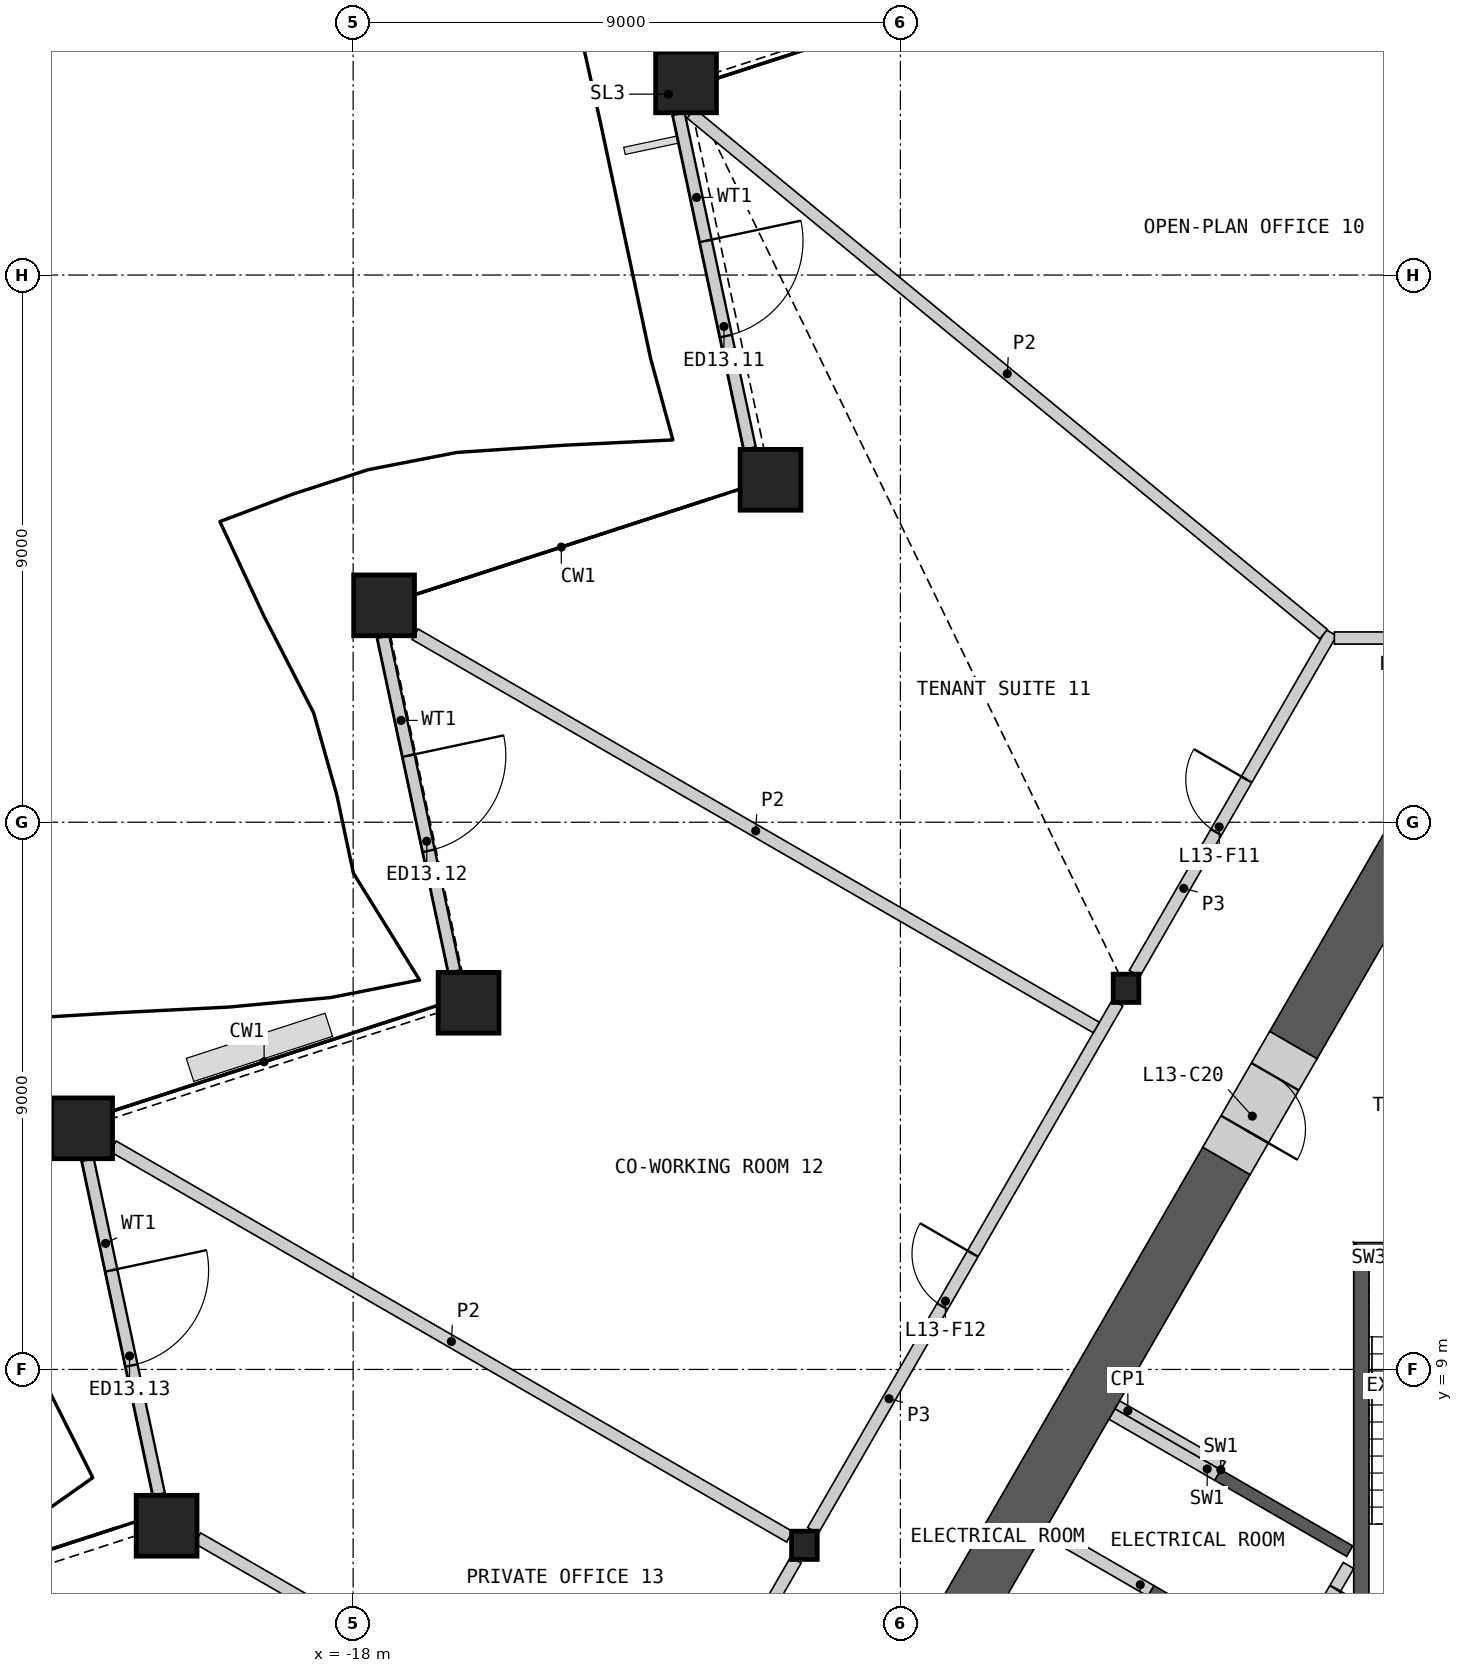
"""IFC4 building model, lengths in metres.
Left out: names, types, materials, properties, quantities, classifications, styles, units other than length and angle.
Written with IfcOpenShell. Run it as: python <this file> out.ifc"""

import sys

from ifc_helpers import new_model, si_unit, direction, frame, frame_2d, origin, origin_2d, place, context, subcontext, project, spatial, polyline, rectangle, hollow_rectangle, i_section, outline, extrude, element, fill, save


model = new_model("IFC4")
c1 = context("Model", 3, precision=1e-05, world=origin(), true_north=direction((0.0, 1.0)))
c2 = subcontext(c1, "Body", "Model", "MODEL_VIEW")
j1 = project(units=[si_unit("LENGTHUNIT", "METRE"), si_unit("PLANEANGLEUNIT", "RADIAN")], contexts=[c1])
p1 = place(None, origin())
s1 = spatial("IfcSite", under=j1, at=p1, CompositionType="ELEMENT")
p2 = place(p1, origin())
s2 = spatial("IfcBuilding", under=s1, at=p2, CompositionType="ELEMENT")
p3 = place(p2, frame((0.0, 0.0, 63.6)))
s3 = spatial("IfcBuildingStorey", under=s2, at=p3, CompositionType="ELEMENT", Elevation=63.6)
for number, where, z_axis, x_axis in (
    (1, (-12.525, 30.169, 0.0), (0.0, 0.0, 1.0), (1.0, 0.0, 0.0)),
    (2, (-11.136, 23.632, 0.0), (0.0, 0.0, 1.0), (1.0, 0.0, 0.0)),
    (3, (-17.491, 21.567, 0.0), (0.0, 0.0, 1.0), (1.0, 0.0, 0.0)),
    (4, (-16.102, 15.031, 0.0), (0.0, 0.0, 1.0), (1.0, 0.0, 0.0)),
    (5, (-22.457, 12.966, 0.0), (0.0, 0.0, 1.0), (1.0, 0.0, 0.0)),
    (6, (-21.068, 6.429, 0.0), (0.0, 0.0, 1.0), (1.0, 0.0, 0.0)),
):
    element("IfcColumn", number, at=place(p3, frame(where, z_axis=z_axis, x_axis=x_axis)), inside=s3, PredefinedType="COLUMN", context=c2, shape_type="SweptSolid", body=[
        extrude(hollow_rectangle(XDim=1.0, YDim=1.0, WallThickness=0.07, at=origin_2d()), origin(), (0.0, 0.0, 1.0), 4.2),
    ])
for number, where, z_axis, x_axis in (
    (7, (-5.289, 15.269, 0.0), (0.0, 0.0, 1.0), (1.0, 0.0, 0.0)),
    (8, (-10.578, 6.107, 0.0), (0.0, 0.0, 1.0), (1.0, 0.0, 0.0)),
):
    element("IfcColumn", number, at=place(p3, frame(where, z_axis=z_axis, x_axis=x_axis)), inside=s3, PredefinedType="COLUMN", context=c2, shape_type="SweptSolid", body=[
        extrude(i_section(OverallWidth=0.421, OverallDepth=0.465, WebThickness=0.045, FlangeThickness=0.072, at=origin_2d()), origin(), (0.0, 0.0, 1.0), 4.2),
    ])
p4 = place(p3, frame((-12.646, 29.652, 0.0), z_axis=(0.0, 0.0, 1.0), x_axis=(0.207901831982, -0.978149696242, 0.0)))
e9 = element("IfcWall", 9, at=p4, inside=s3, PredefinedType="SOLIDWALL", context=c2, shape_type="SweptSolid", body=[
    extrude(rectangle(XDim=5.626, YDim=0.2, at=frame_2d((2.813, 0.0))), origin(), (0.0, 0.0, 1.0), 3.189),
])
p5 = place(p4, frame((2.137, 0.0, 0.0)))
e10 = element("IfcOpeningElement", 10, at=p5, cuts=e9, PredefinedType="OPENING", context=c2, shape_type="SweptSolid", body=[
    extrude(rectangle(XDim=1.6, YDim=2.4, at=frame_2d((0.8, 1.2))), frame((0.0, 0.11, 0.0), z_axis=(0.0, -1.0, 0.0), x_axis=(1.0, 0.0, 0.0)), (0.0, 0.0, 1.0), 0.22),
])
p6 = place(p3, frame((-17.504, 21.051, 0.0), z_axis=(0.0, 0.0, 1.0), x_axis=(0.207901831982, -0.978149696242, 0.0)))
e11 = element("IfcWall", 11, at=p6, inside=s3, PredefinedType="SOLIDWALL", context=c2, shape_type="SweptSolid", body=[
    extrude(rectangle(XDim=5.626, YDim=0.2, at=frame_2d((2.813, 0.0))), origin(), (0.0, 0.0, 1.0), 3.189),
])
p7 = place(p6, frame((1.998, 0.0, 0.0)))
e12 = element("IfcOpeningElement", 12, at=p7, cuts=e11, PredefinedType="OPENING", context=c2, shape_type="SweptSolid", body=[
    extrude(rectangle(XDim=1.6, YDim=2.4, at=frame_2d((0.8, 1.2))), frame((0.0, 0.11, 0.0), z_axis=(0.0, -1.0, 0.0), x_axis=(1.0, 0.0, 0.0)), (0.0, 0.0, 1.0), 0.22),
])
p8 = place(p3, frame((-22.363, 12.449, 0.0), z_axis=(0.0, 0.0, 1.0), x_axis=(0.207901831982, -0.978149696242, 0.0)))
e13 = element("IfcWall", 13, at=p8, inside=s3, PredefinedType="SOLIDWALL", context=c2, shape_type="SweptSolid", body=[
    extrude(rectangle(XDim=5.626, YDim=0.2, at=frame_2d((2.813, 0.0))), origin(), (0.0, 0.0, 1.0), 3.189),
])
p9 = place(p8, frame((1.86, 0.0, 0.0)))
e14 = element("IfcOpeningElement", 14, at=p9, cuts=e13, PredefinedType="OPENING", context=c2, shape_type="SweptSolid", body=[
    extrude(rectangle(XDim=1.6, YDim=2.4, at=frame_2d((0.8, 1.2))), frame((0.0, 0.11, 0.0), z_axis=(0.0, -1.0, 0.0), x_axis=(1.0, 0.0, 0.0)), (0.0, 0.0, 1.0), 0.22),
])
p10 = place(p3, origin())
e15 = element("IfcWall", 15, at=p10, inside=s3, PredefinedType="SHEAR", context=c2, shape_type="SweptSolid", body=[
    extrude(outline(polyline([(-2.76, 4.019), (-4.931, 5.272), (-4.831, 5.445), (-2.66, 4.192), (-2.76, 4.019)])), origin(), (0.0, 0.0, 1.0), 3.8),
])
p11 = place(p3, origin())
e16 = element("IfcWall", 16, at=p11, inside=s3, PredefinedType="SHEAR", context=c2, shape_type="SweptSolid", body=[
    extrude(outline(polyline([(-3.731, 7.35), (-1.561, 6.097), (-1.66, 5.924), (-3.831, 7.177), (-3.731, 7.35)])), origin(), (0.0, 0.0, 1.0), 3.8),
])
p12 = place(p3, frame((-1.631, 5.776, 0.0), z_axis=(0.0, 0.0, 1.0), x_axis=(-0.499992876559, -0.866029516466, 0.0)))
e17 = element("IfcWall", 17, at=p12, inside=s3, PredefinedType="SOLIDWALL", context=c2, shape_type="SweptSolid", body=[
    extrude(rectangle(XDim=6.486, YDim=0.2, at=frame_2d((3.243, 0.0))), origin(), (0.0, 0.0, 1.0), 3.8),
])
p13 = place(p12, frame((0.437, 0.0, 0.0)))
e18 = element("IfcOpeningElement", 18, at=p13, cuts=e17, PredefinedType="OPENING", context=c2, shape_type="SweptSolid", body=[
    extrude(rectangle(XDim=0.9, YDim=2.1, at=frame_2d((0.45, 1.05))), frame((0.0, 0.11, 0.0), z_axis=(0.0, -1.0, 0.0), x_axis=(1.0, 0.0, 0.0)), (0.0, 0.0, 1.0), 0.22),
])
p14 = place(p12, frame((2.637, 0.0, 0.0)))
e19 = element("IfcOpeningElement", 19, at=p14, cuts=e17, PredefinedType="OPENING", context=c2, shape_type="SweptSolid", body=[
    extrude(rectangle(XDim=0.9, YDim=2.1, at=frame_2d((0.45, 1.05))), frame((0.0, 0.11, 0.0), z_axis=(0.0, -1.0, 0.0), x_axis=(1.0, 0.0, 0.0)), (0.0, 0.0, 1.0), 0.22),
])
p15 = place(p3, frame((-3.781, 7.263, 0.0), z_axis=(0.0, 0.0, 1.0), x_axis=(-0.865983199114, 0.50007309351, 0.0)))
e20 = element("IfcWall", 20, at=p15, inside=s3, PredefinedType="SHEAR", context=c2, shape_type="SweptSolid", body=[
    extrude(rectangle(XDim=2.009, YDim=0.2, at=frame_2d((1.004, 0.0))), origin(), (0.0, 0.0, 1.0), 3.8),
])
p16 = place(p3, frame((-4.881, 5.358, 0.0), z_axis=(0.0, 0.0, 1.0), x_axis=(-0.866035824272, 0.499981950752, 0.0)))
e21 = element("IfcWall", 21, at=p16, inside=s3, PredefinedType="SHEAR", context=c2, shape_type="SweptSolid", body=[
    extrude(rectangle(XDim=2.009, YDim=0.2, at=frame_2d((1.004, 0.0))), origin(), (0.0, 0.0, 1.0), 3.8),
])
p17 = place(p3, origin())
e22 = element("IfcWall", 22, at=p17, inside=s3, PredefinedType="SHEAR", context=c2, shape_type="SweptSolid", body=[
    extrude(outline(polyline([(1.544, 11.087), (-1.544, 11.087), (-1.294, 10.837), (1.294, 10.837), (1.544, 11.087)])), origin(), (0.0, 0.0, 1.0), 3.8),
])
p18 = place(p3, origin())
e23 = element("IfcWall", 23, at=p18, inside=s3, PredefinedType="SHEAR", context=c2, shape_type="SweptSolid", body=[
    extrude(outline(polyline([(-1.294, 10.837), (-1.544, 11.087), (-1.544, 5.237), (-1.294, 5.237), (-1.294, 10.837)])), origin(), (0.0, 0.0, 1.0), 3.8),
])
p19 = place(p3, frame((-3.693, 7.415, 0.0), z_axis=(0.0, 0.0, 1.0), x_axis=(-0.866035824272, 0.499981950752, 0.0)))
e24 = element("IfcWall", 24, at=p19, inside=s3, PredefinedType="PARTITIONING", context=c2, shape_type="SweptSolid", body=[
    extrude(rectangle(XDim=2.009, YDim=0.15, at=frame_2d((1.004, 0.0))), origin(), (0.0, 0.0, 1.0), 3.8),
])
p20 = place(p3, frame((-3.637, 12.43, 0.0), z_axis=(0.0, 0.0, 1.0), x_axis=(-0.500011513458, -0.866018756384, 0.0)))
e25 = element("IfcWall", 25, at=p20, inside=s3, PredefinedType="SHEAR", context=c2, shape_type="SweptSolid", body=[
    extrude(rectangle(XDim=9.066, YDim=0.9, at=frame_2d((4.533, 0.0))), origin(), (0.0, 0.0, 1.0), 3.8),
])
p21 = place(p3, frame((-0.39, 18.055, 0.0), z_axis=(0.0, 0.0, 1.0), x_axis=(-0.500014347272, -0.866017120224, 0.0)))
e26 = element("IfcWall", 26, at=p21, inside=s3, PredefinedType="SHEAR", context=c2, shape_type="SweptSolid", body=[
    extrude(rectangle(XDim=4.296, YDim=0.9, at=frame_2d((2.148, 0.0))), origin(), (0.0, 0.0, 1.0), 3.8),
])
p22 = place(p3, frame((-2.538, 14.335, 0.0), z_axis=(0.0, 0.0, 1.0), x_axis=(-0.499994660107, -0.866028486751, 0.0)))
e27 = element("IfcWall", 27, at=p22, inside=s3, PredefinedType="SHEAR", context=c2, shape_type="SweptSolid", body=[
    extrude(rectangle(XDim=2.2, YDim=0.9, at=frame_2d((1.1, 0.0))), origin(), (0.0, 0.0, 1.0), 3.8),
])
p23 = place(p22, frame((0.6, 0.0, 0.0)))
e28 = element("IfcOpeningElement", 28, at=p23, cuts=e27, PredefinedType="OPENING", context=c2, shape_type="SweptSolid", body=[
    extrude(rectangle(XDim=1.0, YDim=2.1, at=frame_2d((0.5, 1.05))), frame((0.0, 0.46, 0.0), z_axis=(0.0, -1.0, 0.0), x_axis=(1.0, 0.0, 0.0)), (0.0, 0.0, 1.0), 0.92),
])
p24 = place(p3, frame((-10.439, 6.35, 0.0), z_axis=(0.0, 0.0, 1.0), x_axis=(0.50001002959, 0.86601961312, 0.0)))
e29 = element("IfcWall", 29, at=p24, inside=s3, PredefinedType="PARTITIONING", context=c2, shape_type="SweptSolid", body=[
    extrude(rectangle(XDim=10.019, YDim=0.2, at=frame_2d((5.009, 0.0))), origin(), (0.0, 0.0, 1.0), 3.8),
])
p25 = place(p24, frame((4.259, 0.0, 0.0)))
e30 = element("IfcOpeningElement", 30, at=p25, cuts=e29, PredefinedType="OPENING", context=c2, shape_type="SweptSolid", body=[
    extrude(rectangle(XDim=1.0, YDim=2.1, at=frame_2d((0.5, 1.05))), frame((0.0, 0.11, 0.0), z_axis=(0.0, -1.0, 0.0), x_axis=(1.0, 0.0, 0.0)), (0.0, 0.0, 1.0), 0.22),
])
p26 = place(p3, frame((-15.728, -2.811, 0.0), z_axis=(0.0, 0.0, 1.0), x_axis=(0.49999175339, 0.866030164915, 0.0)))
e31 = element("IfcWall", 31, at=p26, inside=s3, PredefinedType="PARTITIONING", context=c2, shape_type="SweptSolid", body=[
    extrude(rectangle(XDim=10.019, YDim=0.2, at=frame_2d((5.009, 0.0))), origin(), (0.0, 0.0, 1.0), 3.8),
])
p27 = place(p26, frame((7.266, 0.0, 0.0)))
e32 = element("IfcOpeningElement", 32, at=p27, cuts=e31, PredefinedType="OPENING", context=c2, shape_type="SweptSolid", body=[
    extrude(rectangle(XDim=1.0, YDim=2.1, at=frame_2d((0.5, 1.05))), frame((0.0, 0.11, 0.0), z_axis=(0.0, -1.0, 0.0), x_axis=(1.0, 0.0, 0.0)), (0.0, 0.0, 1.0), 0.22),
])
p28 = place(p3, frame((-5.149, 15.511, 0.0), z_axis=(0.0, 0.0, 1.0), x_axis=(0.500001069878, 0.866024786089, 0.0)))
e33 = element("IfcWall", 33, at=p28, inside=s3, PredefinedType="PARTITIONING", context=c2, shape_type="SweptSolid", body=[
    extrude(rectangle(XDim=6.473, YDim=0.2, at=frame_2d((3.236, 0.0))), origin(), (0.0, 0.0, 1.0), 3.8),
])
p29 = place(p28, frame((2.686, 0.0, 0.0)))
e34 = element("IfcOpeningElement", 34, at=p29, cuts=e33, PredefinedType="OPENING", context=c2, shape_type="SweptSolid", body=[
    extrude(rectangle(XDim=1.0, YDim=2.1, at=frame_2d((0.5, 1.05))), frame((0.0, 0.11, 0.0), z_axis=(0.0, -1.0, 0.0), x_axis=(1.0, 0.0, 0.0)), (0.0, 0.0, 1.0), 0.22),
])
p30 = place(p3, frame((-1.863, 21.03, 0.0), z_axis=(0.0, 0.0, 1.0), x_axis=(1.0, 0.0, 0.0)))
e35 = element("IfcWall", 35, at=p30, inside=s3, PredefinedType="PARTITIONING", context=c2, shape_type="SweptSolid", body=[
    extrude(rectangle(XDim=3.726, YDim=0.2, at=frame_2d((1.863, 0.0))), origin(), (0.0, 0.0, 1.0), 3.8),
])
p31 = place(p30, frame((0.963, 0.0, 0.0)))
e36 = element("IfcOpeningElement", 36, at=p31, cuts=e35, PredefinedType="OPENING", context=c2, shape_type="SweptSolid", body=[
    extrude(rectangle(XDim=1.8, YDim=2.1, at=frame_2d((0.9, 1.05))), frame((0.0, 0.11, 0.0), z_axis=(0.0, -1.0, 0.0), x_axis=(1.0, 0.0, 0.0)), (0.0, 0.0, 1.0), 0.22),
])
p32 = place(p3, frame((-12.445, 29.659, 0.0), z_axis=(0.0, 0.0, 1.0), x_axis=(0.772048928551, -0.635563098302, 0.0)))
e37 = element("IfcWall", 37, at=p32, inside=s3, PredefinedType="PARTITIONING", context=c2, shape_type="SweptSolid", body=[
    extrude(rectangle(XDim=13.477, YDim=0.2, at=frame_2d((6.738, 0.0))), origin(), (0.0, 0.0, 1.0), 2.885),
])
p33 = place(p3, frame((-16.981, 21.092, 0.0), z_axis=(0.0, 0.0, 1.0), x_axis=(0.866026884493, -0.499997435328, 0.0)))
e38 = element("IfcWall", 38, at=p33, inside=s3, PredefinedType="PARTITIONING", context=c2, shape_type="SweptSolid", body=[
    extrude(rectangle(XDim=12.937, YDim=0.2, at=frame_2d((6.469, 0.0))), origin(), (0.0, 0.0, 1.0), 2.885),
])
p34 = place(p3, frame((-21.947, 12.671, 0.0), z_axis=(0.0, 0.0, 1.0), x_axis=(0.866026729935, -0.499997703033, 0.0)))
e39 = element("IfcWall", 39, at=p34, inside=s3, PredefinedType="PARTITIONING", context=c2, shape_type="SweptSolid", body=[
    extrude(rectangle(XDim=12.848, YDim=0.2, at=frame_2d((6.424, 0.0))), origin(), (0.0, 0.0, 1.0), 2.885),
])
p35 = place(p3, frame((-20.558, 6.225, 0.0), z_axis=(0.0, 0.0, 1.0), x_axis=(0.866031967744, -0.499988630717, 0.0)))
e40 = element("IfcWall", 40, at=p35, inside=s3, PredefinedType="PARTITIONING", context=c2, shape_type="SweptSolid", body=[
    extrude(rectangle(XDim=8.601, YDim=0.2, at=frame_2d((4.301, 0.0))), origin(), (0.0, 0.0, 1.0), 2.885),
])
p36 = place(p5, origin())
e41 = element("IfcDoor", 41, at=p36, inside=s3, OperationType="DOUBLE_DOOR_SINGLE_SWING", PredefinedType="DOOR", context=c2, shape_type="SweptSolid", body=[
    extrude(rectangle(XDim=1.6, YDim=2.4, at=frame_2d((0.8, 1.2))), frame((0.0, 0.025, 0.0), z_axis=(0.0, -1.0, 0.0), x_axis=(1.0, 0.0, 0.0)), (0.0, 0.0, 1.0), 0.05),
])
fill(e10, e41)
p37 = place(p7, origin())
e42 = element("IfcDoor", 42, at=p37, inside=s3, OperationType="DOUBLE_DOOR_SINGLE_SWING", PredefinedType="DOOR", context=c2, shape_type="SweptSolid", body=[
    extrude(rectangle(XDim=1.6, YDim=2.4, at=frame_2d((0.8, 1.2))), frame((0.0, 0.025, 0.0), z_axis=(0.0, -1.0, 0.0), x_axis=(1.0, 0.0, 0.0)), (0.0, 0.0, 1.0), 0.05),
])
fill(e12, e42)
p38 = place(p9, origin())
e43 = element("IfcDoor", 43, at=p38, inside=s3, OperationType="DOUBLE_DOOR_SINGLE_SWING", PredefinedType="DOOR", context=c2, shape_type="SweptSolid", body=[
    extrude(rectangle(XDim=1.6, YDim=2.4, at=frame_2d((0.8, 1.2))), frame((0.0, 0.025, 0.0), z_axis=(0.0, -1.0, 0.0), x_axis=(1.0, 0.0, 0.0)), (0.0, 0.0, 1.0), 0.05),
])
fill(e14, e43)
p39 = place(p13, origin())
e44 = element("IfcDoor", 44, at=p39, inside=s3, OperationType="SINGLE_SWING_LEFT", PredefinedType="DOOR", context=c2, shape_type="SweptSolid", body=[
    extrude(rectangle(XDim=0.9, YDim=2.1, at=frame_2d((0.45, 1.05))), frame((0.0, 0.025, 0.0), z_axis=(0.0, -1.0, 0.0), x_axis=(1.0, 0.0, 0.0)), (0.0, 0.0, 1.0), 0.05),
])
fill(e18, e44)
p40 = place(p23, origin())
e45 = element("IfcDoor", 45, at=p40, inside=s3, OperationType="SINGLE_SWING_RIGHT", PredefinedType="DOOR", context=c2, shape_type="SweptSolid", body=[
    extrude(rectangle(XDim=1.0, YDim=2.1, at=frame_2d((0.5, 1.05))), frame((0.0, 0.205, 0.0), z_axis=(0.0, -1.0, 0.0), x_axis=(1.0, 0.0, 0.0)), (0.0, 0.0, 1.0), 0.05),
])
fill(e28, e45)
p41 = place(p29, origin())
e46 = element("IfcDoor", 46, at=p41, inside=s3, OperationType="SINGLE_SWING_RIGHT", PredefinedType="DOOR", context=c2, shape_type="SweptSolid", body=[
    extrude(rectangle(XDim=1.0, YDim=2.1, at=frame_2d((0.5, 1.05))), frame((0.0, 0.025, 0.0), z_axis=(0.0, -1.0, 0.0), x_axis=(1.0, 0.0, 0.0)), (0.0, 0.0, 1.0), 0.05),
])
fill(e34, e46)
p42 = place(p25, origin())
e47 = element("IfcDoor", 47, at=p42, inside=s3, OperationType="SINGLE_SWING_RIGHT", PredefinedType="DOOR", context=c2, shape_type="SweptSolid", body=[
    extrude(rectangle(XDim=1.0, YDim=2.1, at=frame_2d((0.5, 1.05))), frame((0.0, 0.025, 0.0), z_axis=(0.0, -1.0, 0.0), x_axis=(1.0, 0.0, 0.0)), (0.0, 0.0, 1.0), 0.05),
])
fill(e30, e47)
save(model, sys.argv[1])
